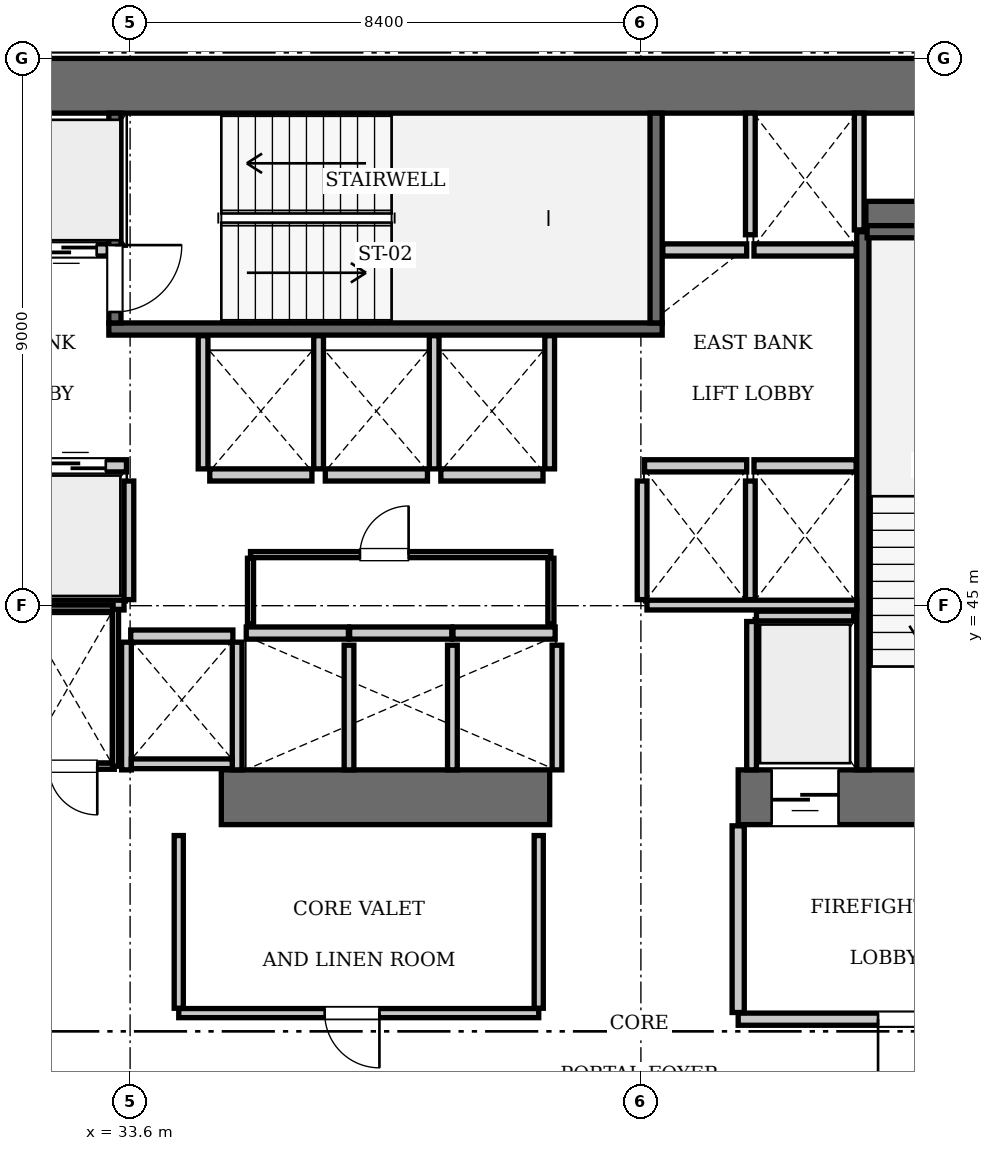
"""IFC4 building model, lengths in metres.
Left out: names, types, materials, properties, quantities, classifications, styles, units other than length and angle.
Written with IfcOpenShell. Run it as: python <this file> out.ifc"""

import sys

from ifc_helpers import new_model, si_unit, direction, frame, frame_2d, origin, place, context, subcontext, project, spatial, rectangle, extrude, element, fill, save


model = new_model("IFC4")
c1 = context("Model", 3, precision=1e-05, world=origin(), true_north=direction((0.0, 1.0)))
c2 = subcontext(c1, "Body", "Model", "MODEL_VIEW")
j1 = project(units=[si_unit("LENGTHUNIT", "METRE"), si_unit("PLANEANGLEUNIT", "RADIAN")], contexts=[c1])
p1 = place(None, origin())
s1 = spatial("IfcSite", under=j1, at=p1, CompositionType="ELEMENT")
p2 = place(p1, origin())
s2 = spatial("IfcBuilding", under=s1, at=p2, CompositionType="ELEMENT")
p3 = place(p2, frame((0.0, 0.0, 42.35)))
s3 = spatial("IfcBuildingStorey", under=s2, at=p3, CompositionType="ELEMENT", Elevation=42.35)
p4 = place(p3, frame((25.2, 53.55, 0.0), z_axis=(0.0, 0.0, 1.0), x_axis=(1.0, 0.0, 0.0)))
e1 = element("IfcWall", 1, at=p4, inside=s3, PredefinedType="SHEAR", context=c2, shape_type="SweptSolid", body=[
    extrude(rectangle(XDim=25.2, YDim=0.9, at=frame_2d((12.6, 0.0))), origin(), (0.0, 0.0, 1.0), 3.85),
])
p5 = place(p3, frame((35.1, 41.85, 0.0), z_axis=(0.0, 0.0, 1.0), x_axis=(1.0, 0.0, 0.0)))
e2 = element("IfcWall", 2, at=p5, inside=s3, PredefinedType="SHEAR", context=c2, shape_type="SweptSolid", body=[
    extrude(rectangle(XDim=5.4, YDim=0.9, at=frame_2d((2.7, 0.0))), origin(), (0.0, 0.0, 1.0), 3.85),
])
p6 = place(p3, frame((43.6, 41.85, 0.0), z_axis=(0.0, 0.0, 1.0), x_axis=(1.0, 0.0, 0.0)))
e3 = element("IfcWall", 3, at=p6, inside=s3, PredefinedType="SHEAR", context=c2, shape_type="SweptSolid", body=[
    extrude(rectangle(XDim=6.8, YDim=0.9, at=frame_2d((3.4, 0.0))), origin(), (0.0, 0.0, 1.0), 3.85),
])
p7 = place(p6, frame((3.9, 0.0, 0.0)))
e4 = element("IfcOpeningElement", 4, at=p7, cuts=e3, PredefinedType="OPENING", context=c2, shape_type="SweptSolid", body=[
    extrude(rectangle(XDim=1.15, YDim=2.15, at=frame_2d((0.575, 1.075))), frame((0.0, 0.46, 0.0), z_axis=(0.0, -1.0, 0.0), x_axis=(1.0, 0.0, 0.0)), (0.0, 0.0, 1.0), 0.92),
])
p8 = place(p6, frame((0.55, 0.0, 0.0)))
e5 = element("IfcOpeningElement", 5, at=p8, cuts=e3, PredefinedType="OPENING", context=c2, shape_type="SweptSolid", body=[
    extrude(rectangle(XDim=1.1, YDim=2.2, at=frame_2d((0.55, 1.1))), frame((0.0, 0.46, 0.0), z_axis=(0.0, -1.0, 0.0), x_axis=(1.0, 0.0, 0.0)), (0.0, 0.0, 1.0), 0.92),
])
p9 = place(p3, frame((45.7, 51.4, 0.0), z_axis=(0.0, 0.0, 1.0), x_axis=(1.0, 0.0, 0.0)))
e6 = element("IfcWall", 6, at=p9, inside=s3, PredefinedType="SHEAR", context=c2, shape_type="SweptSolid", body=[
    extrude(rectangle(XDim=3.8, YDim=0.5, at=frame_2d((1.9, 0.0))), origin(), (0.0, 0.0, 1.0), 3.85),
])
p10 = place(p3, frame((33.25, 49.55, 0.0), z_axis=(0.0, 0.0, 1.0), x_axis=(1.0, 0.0, 0.0)))
e7 = element("IfcWall", 7, at=p10, inside=s3, PredefinedType="SOLIDWALL", context=c2, shape_type="SweptSolid", body=[
    extrude(rectangle(XDim=9.1, YDim=0.2, at=frame_2d((4.55, 0.0))), origin(), (0.0, 0.0, 1.0), 3.61),
])
p11 = place(p3, frame((42.25, 49.65, 0.0), z_axis=(0.0, 0.0, 1.0), x_axis=(0.0, 1.0, 0.0)))
e8 = element("IfcWall", 8, at=p11, inside=s3, PredefinedType="SOLIDWALL", context=c2, shape_type="SweptSolid", body=[
    extrude(rectangle(XDim=3.45, YDim=0.2, at=frame_2d((1.725, 0.0))), origin(), (0.0, 0.0, 1.0), 3.61),
])
p12 = place(p3, frame((33.35, 49.65, 0.0), z_axis=(0.0, 0.0, 1.0), x_axis=(0.0, 1.0, 0.0)))
e9 = element("IfcWall", 9, at=p12, inside=s3, PredefinedType="SOLIDWALL", context=c2, shape_type="SweptSolid", body=[
    extrude(rectangle(XDim=3.45, YDim=0.2, at=frame_2d((1.725, 0.0))), origin(), (0.0, 0.0, 1.0), 3.61),
])
p13 = place(p12, frame((0.18, 0.0, 0.0)))
e10 = element("IfcOpeningElement", 10, at=p13, cuts=e9, PredefinedType="OPENING", context=c2, shape_type="SweptSolid", body=[
    extrude(rectangle(XDim=1.1, YDim=2.15, at=frame_2d((0.55, 1.075))), frame((0.0, 0.11, 0.0), z_axis=(0.0, -1.0, 0.0), x_axis=(1.0, 0.0, 0.0)), (0.0, 0.0, 1.0), 0.22),
])
p14 = place(p3, frame((45.65, 42.3, 0.0), z_axis=(0.0, 0.0, 1.0), x_axis=(0.0, 1.0, 0.0)))
e11 = element("IfcWall", 11, at=p14, inside=s3, PredefinedType="SOLIDWALL", context=c2, shape_type="SweptSolid", body=[
    extrude(rectangle(XDim=8.85, YDim=0.2, at=frame_2d((4.425, 0.0))), origin(), (0.0, 0.0, 1.0), 3.61),
])
p15 = place(p3, frame((45.72, 51.15, 0.0), z_axis=(0.0, 0.0, 1.0), x_axis=(1.0, 0.0, 0.0)))
e12 = element("IfcWall", 12, at=p15, inside=s3, PredefinedType="SOLIDWALL", context=c2, shape_type="SweptSolid", body=[
    extrude(rectangle(XDim=3.5, YDim=0.2, at=frame_2d((1.75, 0.0))), origin(), (0.0, 0.0, 1.0), 3.61),
])
p16 = place(p3, frame((31.86, 47.3, 0.0), z_axis=(0.0, 0.0, 1.0), x_axis=(1.0, 0.0, 0.0)))
e13 = element("IfcWall", 13, at=p16, inside=s3, PredefinedType="SOLIDWALL", context=c2, shape_type="SweptSolid", body=[
    extrude(rectangle(XDim=1.68, YDim=0.2, at=frame_2d((0.84, 0.0))), origin(), (0.0, 0.0, 1.0), 3.61),
])
p17 = place(p16, frame((0.34, 0.0, 0.0)))
e14 = element("IfcOpeningElement", 14, at=p17, cuts=e13, PredefinedType="OPENING", context=c2, shape_type="SweptSolid", body=[
    extrude(rectangle(XDim=1.0, YDim=2.15, at=frame_2d((0.5, 1.075))), frame((0.0, 0.11, 0.0), z_axis=(0.0, -1.0, 0.0), x_axis=(1.0, 0.0, 0.0)), (0.0, 0.0, 1.0), 0.22),
])
p18 = place(p3, frame((31.86, 50.85, 0.0), z_axis=(0.0, 0.0, 1.0), x_axis=(1.0, 0.0, 0.0)))
e15 = element("IfcWall", 15, at=p18, inside=s3, PredefinedType="SOLIDWALL", context=c2, shape_type="SweptSolid", body=[
    extrude(rectangle(XDim=1.38, YDim=0.2, at=frame_2d((0.69, 0.0))), origin(), (0.0, 0.0, 1.0), 3.61),
])
p19 = place(p18, frame((0.19, 0.0, 0.0)))
e16 = element("IfcOpeningElement", 16, at=p19, cuts=e15, PredefinedType="OPENING", context=c2, shape_type="SweptSolid", body=[
    extrude(rectangle(XDim=1.0, YDim=2.15, at=frame_2d((0.5, 1.075))), frame((0.0, 0.11, 0.0), z_axis=(0.0, -1.0, 0.0), x_axis=(1.0, 0.0, 0.0)), (0.0, 0.0, 1.0), 0.22),
])
for number, where, z_axis, x_axis in (
    (17, (42.06, 47.3, 0.0), (0.0, 0.0, 1.0), (1.0, 0.0, 0.0)),
    (18, (43.86, 47.3, 0.0), (0.0, 0.0, 1.0), (1.0, 0.0, 0.0)),
):
    element("IfcWall", number, at=place(p3, frame(where, z_axis=z_axis, x_axis=x_axis)), inside=s3, PredefinedType="SOLIDWALL", context=c2, shape_type="SweptSolid", body=[
        extrude(rectangle(XDim=1.68, YDim=0.2, at=frame_2d((0.84, 0.0))), origin(), (0.0, 0.0, 1.0), 3.61),
    ])
p20 = place(p3, frame((42.36, 50.85, 0.0), z_axis=(0.0, 0.0, 1.0), x_axis=(1.0, 0.0, 0.0)))
e19 = element("IfcWall", 19, at=p20, inside=s3, PredefinedType="SOLIDWALL", context=c2, shape_type="SweptSolid", body=[
    extrude(rectangle(XDim=1.38, YDim=0.2, at=frame_2d((0.69, 0.0))), origin(), (0.0, 0.0, 1.0), 3.61),
])
for number, where, z_axis, x_axis in (
    (20, (43.86, 50.85, 0.0), (0.0, 0.0, 1.0), (1.0, 0.0, 0.0)),
    (21, (35.51, 44.55, 0.0), (0.0, 0.0, 1.0), (1.0, 0.0, 0.0)),
    (22, (37.21, 44.55, 0.0), (0.0, 0.0, 1.0), (1.0, 0.0, 0.0)),
):
    element("IfcWall", number, at=place(p3, frame(where, z_axis=z_axis, x_axis=x_axis)), inside=s3, PredefinedType="SOLIDWALL", context=c2, shape_type="SweptSolid", body=[
        extrude(rectangle(XDim=1.68, YDim=0.2, at=frame_2d((0.84, 0.0))), origin(), (0.0, 0.0, 1.0), 3.61),
    ])
for number, where, z_axis, x_axis in (
    (23, (38.91, 44.55, 0.0), (0.0, 0.0, 1.0), (1.0, 0.0, 0.0)),
    (24, (34.91, 47.15, 0.0), (0.0, 0.0, 1.0), (1.0, 0.0, 0.0)),
):
    element("IfcWall", number, at=place(p3, frame(where, z_axis=z_axis, x_axis=x_axis)), inside=s3, PredefinedType="SOLIDWALL", context=c2, shape_type="SweptSolid", body=[
        extrude(rectangle(XDim=1.68, YDim=0.2, at=frame_2d((0.84, 0.0))), origin(), (0.0, 0.0, 1.0), 3.61),
    ])
for number, where, z_axis, x_axis in (
    (25, (36.81, 47.15, 0.0), (0.0, 0.0, 1.0), (1.0, 0.0, 0.0)),
    (26, (38.71, 47.15, 0.0), (0.0, 0.0, 1.0), (1.0, 0.0, 0.0)),
    (27, (33.61, 44.5, 0.0), (0.0, 0.0, 1.0), (1.0, 0.0, 0.0)),
):
    element("IfcWall", number, at=place(p3, frame(where, z_axis=z_axis, x_axis=x_axis)), inside=s3, PredefinedType="SOLIDWALL", context=c2, shape_type="SweptSolid", body=[
        extrude(rectangle(XDim=1.68, YDim=0.2, at=frame_2d((0.84, 0.0))), origin(), (0.0, 0.0, 1.0), 3.61),
    ])
p21 = place(p3, frame((43.9, 44.83, 0.0), z_axis=(0.0, 0.0, 1.0), x_axis=(1.0, 0.0, 0.0)))
e28 = element("IfcWall", 28, at=p21, inside=s3, PredefinedType="SOLIDWALL", context=c2, shape_type="SweptSolid", body=[
    extrude(rectangle(XDim=1.6, YDim=0.16, at=frame_2d((0.8, 0.0))), origin(), (0.0, 0.0, 1.0), 3.61),
])
p22 = place(p3, frame((43.82, 42.3, 0.0), z_axis=(0.0, 0.0, 1.0), x_axis=(0.0, 1.0, 0.0)))
e29 = element("IfcWall", 29, at=p22, inside=s3, PredefinedType="SOLIDWALL", context=c2, shape_type="SweptSolid", body=[
    extrude(rectangle(XDim=2.44, YDim=0.16, at=frame_2d((1.22, 0.0))), origin(), (0.0, 0.0, 1.0), 3.61),
])
p23 = place(p3, frame((33.58, 45.1, 0.0), z_axis=(0.0, 0.0, 1.0), x_axis=(0.0, 1.0, 0.0)))
e30 = element("IfcWall", 30, at=p23, inside=s3, PredefinedType="SOLIDWALL", context=c2, shape_type="SweptSolid", body=[
    extrude(rectangle(XDim=1.95, YDim=0.16, at=frame_2d((0.975, 0.0))), origin(), (0.0, 0.0, 1.0), 3.61),
])
p24 = place(p3, frame((30.05, 45.01, 0.0), z_axis=(0.0, 0.0, 1.0), x_axis=(1.0, 0.0, 0.0)))
e31 = element("IfcWall", 31, at=p24, inside=s3, PredefinedType="SOLIDWALL", context=c2, shape_type="SweptSolid", body=[
    extrude(rectangle(XDim=3.45, YDim=0.16, at=frame_2d((1.725, 0.0))), origin(), (0.0, 0.0, 1.0), 3.61),
])
for number, where, z_axis, x_axis in (
    (32, (42.02, 45.1, 0.0), (0.0, 0.0, 1.0), (0.0, 1.0, 0.0)),
    (33, (43.8, 45.1, 0.0), (0.0, 0.0, 1.0), (0.0, 1.0, 0.0)),
):
    element("IfcWall", number, at=place(p3, frame(where, z_axis=z_axis, x_axis=x_axis)), inside=s3, PredefinedType="SOLIDWALL", context=c2, shape_type="SweptSolid", body=[
        extrude(rectangle(XDim=1.95, YDim=0.16, at=frame_2d((0.975, 0.0))), origin(), (0.0, 0.0, 1.0), 3.61),
    ])
p25 = place(p3, frame((42.1, 45.01, 0.0), z_axis=(0.0, 0.0, 1.0), x_axis=(1.0, 0.0, 0.0)))
e34 = element("IfcWall", 34, at=p25, inside=s3, PredefinedType="SOLIDWALL", context=c2, shape_type="SweptSolid", body=[
    extrude(rectangle(XDim=3.45, YDim=0.16, at=frame_2d((1.725, 0.0))), origin(), (0.0, 0.0, 1.0), 3.61),
])
p26 = place(p3, frame((45.59, 51.18, 0.0), z_axis=(0.0, 0.0, 1.0), x_axis=(0.0, 1.0, 0.0)))
e35 = element("IfcWall", 35, at=p26, inside=s3, PredefinedType="SOLIDWALL", context=c2, shape_type="SweptSolid", body=[
    extrude(rectangle(XDim=1.92, YDim=0.16, at=frame_2d((0.96, 0.0))), origin(), (0.0, 0.0, 1.0), 3.61),
])
p27 = place(p3, frame((43.8, 51.1, 0.0), z_axis=(0.0, 0.0, 1.0), x_axis=(0.0, 1.0, 0.0)))
e36 = element("IfcWall", 36, at=p27, inside=s3, PredefinedType="SOLIDWALL", context=c2, shape_type="SweptSolid", body=[
    extrude(rectangle(XDim=2.0, YDim=0.16, at=frame_2d((1.0, 0.0))), origin(), (0.0, 0.0, 1.0), 3.61),
])
for number, where, z_axis, x_axis in (
    (37, (37.2, 42.3, 0.0), (0.0, 0.0, 1.0), (0.0, 1.0, 0.0)),
    (38, (38.9, 42.3, 0.0), (0.0, 0.0, 1.0), (0.0, 1.0, 0.0)),
    (39, (40.62, 42.3, 0.0), (0.0, 0.0, 1.0), (0.0, 1.0, 0.0)),
):
    element("IfcWall", number, at=place(p3, frame(where, z_axis=z_axis, x_axis=x_axis)), inside=s3, PredefinedType="SOLIDWALL", context=c2, shape_type="SweptSolid", body=[
        extrude(rectangle(XDim=2.05, YDim=0.16, at=frame_2d((1.025, 0.0))), origin(), (0.0, 0.0, 1.0), 3.61),
    ])
for number, where, z_axis, x_axis in (
    (40, (34.8, 47.25, 0.0), (0.0, 0.0, 1.0), (0.0, 1.0, 0.0)),
    (41, (36.7, 47.25, 0.0), (0.0, 0.0, 1.0), (0.0, 1.0, 0.0)),
    (42, (38.6, 47.25, 0.0), (0.0, 0.0, 1.0), (0.0, 1.0, 0.0)),
    (43, (40.5, 47.25, 0.0), (0.0, 0.0, 1.0), (0.0, 1.0, 0.0)),
):
    element("IfcWall", number, at=place(p3, frame(where, z_axis=z_axis, x_axis=x_axis)), inside=s3, PredefinedType="SOLIDWALL", context=c2, shape_type="SweptSolid", body=[
        extrude(rectangle(XDim=2.19, YDim=0.16, at=frame_2d((1.095, 0.0))), origin(), (0.0, 0.0, 1.0), 3.61),
    ])
for number, where, z_axis, x_axis in (
    (44, (33.54, 42.3, 0.0), (0.0, 0.0, 1.0), (0.0, 1.0, 0.0)),
    (45, (35.36, 42.3, 0.0), (0.0, 0.0, 1.0), (0.0, 1.0, 0.0)),
):
    element("IfcWall", number, at=place(p3, frame(where, z_axis=z_axis, x_axis=x_axis)), inside=s3, PredefinedType="SOLIDWALL", context=c2, shape_type="SweptSolid", body=[
        extrude(rectangle(XDim=2.1, YDim=0.16, at=frame_2d((1.05, 0.0))), origin(), (0.0, 0.0, 1.0), 3.61),
    ])
p28 = place(p3, frame((33.62, 42.4, 0.0), z_axis=(0.0, 0.0, 1.0), x_axis=(1.0, 0.0, 0.0)))
e46 = element("IfcWall", 46, at=p28, inside=s3, PredefinedType="SOLIDWALL", context=c2, shape_type="SweptSolid", body=[
    extrude(rectangle(XDim=1.66, YDim=0.16, at=frame_2d((0.83, 0.0))), origin(), (0.0, 0.0, 1.0), 3.61),
])
p29 = place(p3, frame((43.6, 38.2, 0.0), z_axis=(0.0, 0.0, 1.0), x_axis=(1.0, 0.0, 0.0)))
e47 = element("IfcWall", 47, at=p29, inside=s3, PredefinedType="PARTITIONING", context=c2, shape_type="SweptSolid", body=[
    extrude(rectangle(XDim=5.8, YDim=0.2, at=frame_2d((2.9, 0.0))), origin(), (0.0, 0.0, 1.0), 3.61),
])
p30 = place(p29, frame((2.3, 0.0, 0.0)))
e48 = element("IfcOpeningElement", 48, at=p30, cuts=e47, PredefinedType="OPENING", context=c2, shape_type="SweptSolid", body=[
    extrude(rectangle(XDim=1.15, YDim=2.15, at=frame_2d((0.575, 1.075))), frame((0.0, 0.11, 0.0), z_axis=(0.0, -1.0, 0.0), x_axis=(1.0, 0.0, 0.0)), (0.0, 0.0, 1.0), 0.22),
])
p31 = place(p3, frame((43.6, 38.31, 0.0), z_axis=(0.0, 0.0, 1.0), x_axis=(0.0, 1.0, 0.0)))
e49 = element("IfcWall", 49, at=p31, inside=s3, PredefinedType="PARTITIONING", context=c2, shape_type="SweptSolid", body=[
    extrude(rectangle(XDim=3.07, YDim=0.2, at=frame_2d((1.535, 0.0))), origin(), (0.0, 0.0, 1.0), 3.61),
])
p32 = place(p3, frame((32.02, 42.36, 0.0), z_axis=(0.0, 0.0, 1.0), x_axis=(1.0, 0.0, 0.0)))
e50 = element("IfcWall", 50, at=p32, inside=s3, PredefinedType="PARTITIONING", context=c2, shape_type="SweptSolid", body=[
    extrude(rectangle(XDim=1.32, YDim=0.1, at=frame_2d((0.66, 0.0))), origin(), (0.0, 0.0, 1.0), 3.61),
])
p33 = place(p32, frame((0.24, 0.0, 0.0)))
e51 = element("IfcOpeningElement", 51, at=p33, cuts=e50, PredefinedType="OPENING", context=c2, shape_type="SweptSolid", body=[
    extrude(rectangle(XDim=0.8, YDim=2.05, at=frame_2d((0.4, 1.025))), frame((0.0, 0.06, 0.0), z_axis=(0.0, -1.0, 0.0), x_axis=(1.0, 0.0, 0.0)), (0.0, 0.0, 1.0), 0.12),
])
p34 = place(p3, frame((31.84, 44.96, 0.0), z_axis=(0.0, 0.0, 1.0), x_axis=(1.0, 0.0, 0.0)))
e52 = element("IfcWall", 52, at=p34, inside=s3, PredefinedType="PARTITIONING", context=c2, shape_type="SweptSolid", body=[
    extrude(rectangle(XDim=1.48, YDim=0.1, at=frame_2d((0.74, 0.0))), origin(), (0.0, 0.0, 1.0), 3.61),
])
p35 = place(p3, frame((33.36, 42.36, 0.0), z_axis=(0.0, 0.0, 1.0), x_axis=(0.0, 1.0, 0.0)))
e53 = element("IfcWall", 53, at=p35, inside=s3, PredefinedType="PARTITIONING", context=c2, shape_type="SweptSolid", body=[
    extrude(rectangle(XDim=2.58, YDim=0.1, at=frame_2d((1.29, 0.0))), origin(), (0.0, 0.0, 1.0), 3.61),
])
p36 = place(p3, frame((35.58, 45.84, 0.0), z_axis=(0.0, 0.0, 1.0), x_axis=(1.0, 0.0, 0.0)))
e54 = element("IfcWall", 54, at=p36, inside=s3, PredefinedType="PARTITIONING", context=c2, shape_type="SweptSolid", body=[
    extrude(rectangle(XDim=4.94, YDim=0.1, at=frame_2d((2.47, 0.0))), origin(), (0.0, 0.0, 1.0), 3.61),
])
p37 = place(p36, frame((1.8, 0.0, 0.0)))
e55 = element("IfcOpeningElement", 55, at=p37, cuts=e54, PredefinedType="OPENING", context=c2, shape_type="SweptSolid", body=[
    extrude(rectangle(XDim=0.8, YDim=2.05, at=frame_2d((0.4, 1.025))), frame((0.0, 0.06, 0.0), z_axis=(0.0, -1.0, 0.0), x_axis=(1.0, 0.0, 0.0)), (0.0, 0.0, 1.0), 0.12),
])
for number, where, z_axis, x_axis in (
    (56, (35.58, 44.7, 0.0), (0.0, 0.0, 1.0), (0.0, 1.0, 0.0)),
    (57, (40.52, 44.7, 0.0), (0.0, 0.0, 1.0), (0.0, 1.0, 0.0)),
):
    element("IfcWall", number, at=place(p3, frame(where, z_axis=z_axis, x_axis=x_axis)), inside=s3, PredefinedType="PARTITIONING", context=c2, shape_type="SweptSolid", body=[
        extrude(rectangle(XDim=1.08, YDim=0.1, at=frame_2d((0.54, 0.0))), origin(), (0.0, 0.0, 1.0), 3.61),
    ])
p38 = place(p3, frame((34.4, 38.3, 0.0), z_axis=(0.0, 0.0, 1.0), x_axis=(1.0, 0.0, 0.0)))
e58 = element("IfcWall", 58, at=p38, inside=s3, PredefinedType="PARTITIONING", context=c2, shape_type="SweptSolid", body=[
    extrude(rectangle(XDim=5.92, YDim=0.15, at=frame_2d((2.96, 0.0))), origin(), (0.0, 0.0, 1.0), 3.61),
])
p39 = place(p38, frame((2.4, 0.0, 0.0)))
e59 = element("IfcOpeningElement", 59, at=p39, cuts=e58, PredefinedType="OPENING", context=c2, shape_type="SweptSolid", body=[
    extrude(rectangle(XDim=0.9, YDim=2.1, at=frame_2d((0.45, 1.05))), frame((0.0, 0.085, 0.0), z_axis=(0.0, -1.0, 0.0), x_axis=(1.0, 0.0, 0.0)), (0.0, 0.0, 1.0), 0.17),
])
for number, where, z_axis, x_axis in (
    (60, (34.4, 38.38, 0.0), (0.0, 0.0, 1.0), (0.0, 1.0, 0.0)),
    (61, (40.32, 38.38, 0.0), (0.0, 0.0, 1.0), (0.0, 1.0, 0.0)),
):
    element("IfcWall", number, at=place(p3, frame(where, z_axis=z_axis, x_axis=x_axis)), inside=s3, PredefinedType="PARTITIONING", context=c2, shape_type="SweptSolid", body=[
        extrude(rectangle(XDim=2.84, YDim=0.15, at=frame_2d((1.42, 0.0))), origin(), (0.0, 0.0, 1.0), 3.61),
    ])
p40 = place(p13, frame((1.1, 0.0, 0.0), z_axis=(0.0, 0.0, 1.0), x_axis=(-1.0, 0.0, 0.0)))
e62 = element("IfcDoor", 62, at=p40, inside=s3, OperationType="SINGLE_SWING_LEFT", PredefinedType="DOOR", context=c2, shape_type="SweptSolid", body=[
    extrude(rectangle(XDim=1.1, YDim=2.15, at=frame_2d((0.55, 1.075))), frame((0.0, 0.025, 0.0), z_axis=(0.0, -1.0, 0.0), x_axis=(1.0, 0.0, 0.0)), (0.0, 0.0, 1.0), 0.05),
])
fill(e10, e62)
p41 = place(p17, origin())
e63 = element("IfcDoor", 63, at=p41, inside=s3, OperationType="SLIDING_TO_LEFT", PredefinedType="DOOR", context=c2, shape_type="SweptSolid", body=[
    extrude(rectangle(XDim=1.0, YDim=2.15, at=frame_2d((0.5, 1.075))), frame((0.0, 0.025, 0.0), z_axis=(0.0, -1.0, 0.0), x_axis=(1.0, 0.0, 0.0)), (0.0, 0.0, 1.0), 0.05),
])
fill(e14, e63)
p42 = place(p19, frame((1.0, 0.0, 0.0), z_axis=(0.0, 0.0, 1.0), x_axis=(-1.0, 0.0, 0.0)))
e64 = element("IfcDoor", 64, at=p42, inside=s3, OperationType="SLIDING_TO_LEFT", PredefinedType="DOOR", context=c2, shape_type="SweptSolid", body=[
    extrude(rectangle(XDim=1.0, YDim=2.15, at=frame_2d((0.5, 1.075))), frame((0.0, 0.025, 0.0), z_axis=(0.0, -1.0, 0.0), x_axis=(1.0, 0.0, 0.0)), (0.0, 0.0, 1.0), 0.05),
])
fill(e16, e64)
p43 = place(p8, frame((1.1, 0.0, 0.0), z_axis=(0.0, 0.0, 1.0), x_axis=(-1.0, 0.0, 0.0)))
e65 = element("IfcDoor", 65, at=p43, inside=s3, OperationType="SLIDING_TO_LEFT", PredefinedType="DOOR", context=c2, shape_type="SweptSolid", body=[
    extrude(rectangle(XDim=1.1, YDim=2.2, at=frame_2d((0.55, 1.1))), frame((0.0, 0.025, 0.0), z_axis=(0.0, -1.0, 0.0), x_axis=(1.0, 0.0, 0.0)), (0.0, 0.0, 1.0), 0.05),
])
fill(e5, e65)
p44 = place(p30, frame((1.15, 0.0, 0.0), z_axis=(0.0, 0.0, 1.0), x_axis=(-1.0, 0.0, 0.0)))
e66 = element("IfcDoor", 66, at=p44, inside=s3, OperationType="SINGLE_SWING_RIGHT", PredefinedType="DOOR", context=c2, shape_type="SweptSolid", body=[
    extrude(rectangle(XDim=1.15, YDim=2.15, at=frame_2d((0.575, 1.075))), frame((0.0, 0.025, 0.0), z_axis=(0.0, -1.0, 0.0), x_axis=(1.0, 0.0, 0.0)), (0.0, 0.0, 1.0), 0.05),
])
fill(e48, e66)
p45 = place(p33, frame((0.8, 0.0, 0.0), z_axis=(0.0, 0.0, 1.0), x_axis=(-1.0, 0.0, 0.0)))
e67 = element("IfcDoor", 67, at=p45, inside=s3, OperationType="SINGLE_SWING_LEFT", PredefinedType="DOOR", context=c2, shape_type="SweptSolid", body=[
    extrude(rectangle(XDim=0.8, YDim=2.05, at=frame_2d((0.4, 1.025))), frame((0.0, 0.025, 0.0), z_axis=(0.0, -1.0, 0.0), x_axis=(1.0, 0.0, 0.0)), (0.0, 0.0, 1.0), 0.05),
])
fill(e51, e67)
p46 = place(p37, origin())
e68 = element("IfcDoor", 68, at=p46, inside=s3, OperationType="SINGLE_SWING_RIGHT", PredefinedType="DOOR", context=c2, shape_type="SweptSolid", body=[
    extrude(rectangle(XDim=0.8, YDim=2.05, at=frame_2d((0.4, 1.025))), frame((0.0, 0.025, 0.0), z_axis=(0.0, -1.0, 0.0), x_axis=(1.0, 0.0, 0.0)), (0.0, 0.0, 1.0), 0.05),
])
fill(e55, e68)
p47 = place(p39, frame((0.9, 0.0, 0.0), z_axis=(0.0, 0.0, 1.0), x_axis=(-1.0, 0.0, 0.0)))
e69 = element("IfcDoor", 69, at=p47, inside=s3, OperationType="SINGLE_SWING_LEFT", PredefinedType="DOOR", context=c2, shape_type="SweptSolid", body=[
    extrude(rectangle(XDim=0.9, YDim=2.1, at=frame_2d((0.45, 1.05))), frame((0.0, 0.025, 0.0), z_axis=(0.0, -1.0, 0.0), x_axis=(1.0, 0.0, 0.0)), (0.0, 0.0, 1.0), 0.05),
])
fill(e59, e69)
save(model, sys.argv[1])
